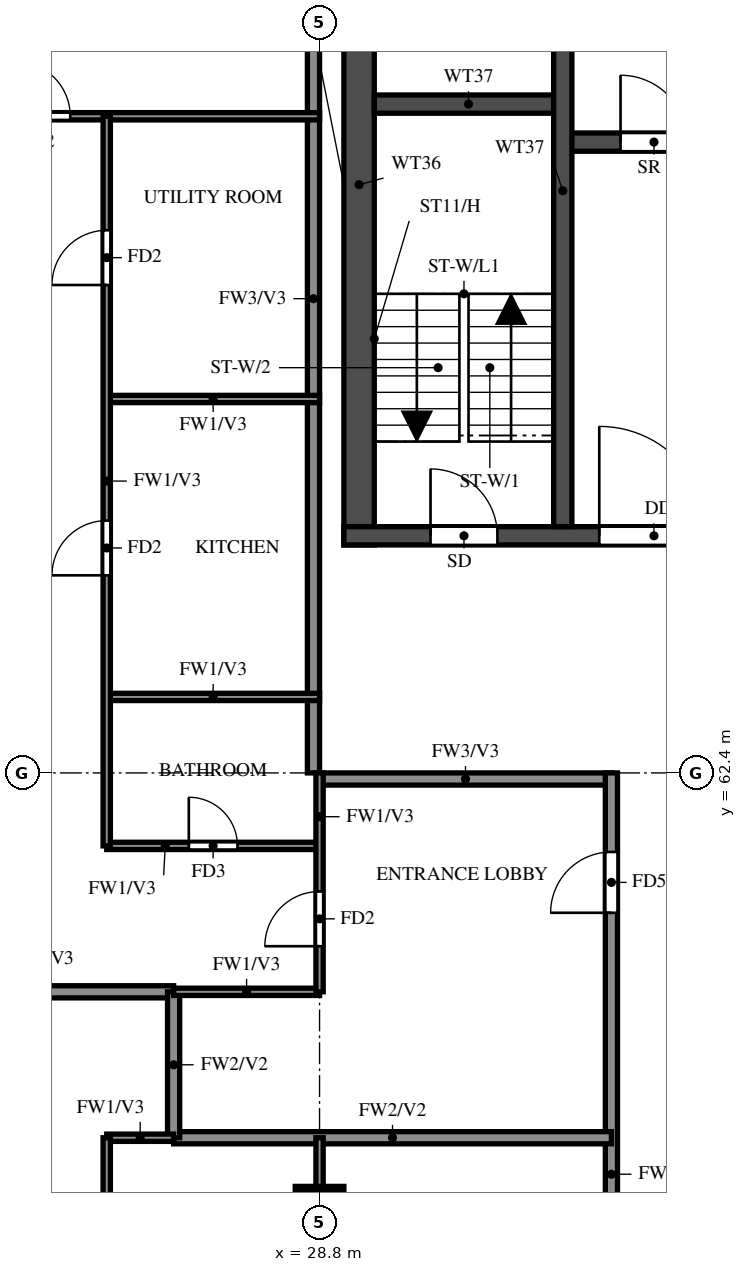
"""IFC4 building model, lengths in metres.
Left out: names, types, materials, properties, quantities, classifications, styles, units other than length and angle.
Written with IfcOpenShell. Run it as: python <this file> out.ifc"""

import sys

from ifc_helpers import new_model, si_unit, direction, frame, frame_2d, origin, origin_2d, place, context, subcontext, project, spatial, rectangle, extrude, source, transform, mapped, element, fill, save


model = new_model("IFC4")
c1 = context("Model", 3, precision=1e-05, world=origin(), true_north=direction((0.0, 1.0)))
c2 = subcontext(c1, "Body", "Model", "MODEL_VIEW")
j1 = project(units=[si_unit("LENGTHUNIT", "METRE"), si_unit("PLANEANGLEUNIT", "RADIAN")], contexts=[c1])
p1 = place(None, origin())
s1 = spatial("IfcSite", under=j1, at=p1, CompositionType="ELEMENT")
p2 = place(p1, origin())
s2 = spatial("IfcBuilding", under=s1, at=p2, CompositionType="ELEMENT")
p3 = place(p2, frame((0.0, 0.0, 232.5)))
s3 = spatial("IfcBuildingStorey", under=s2, at=p3, CompositionType="ELEMENT", Elevation=232.5)
m1 = source(origin(), c2, "Body", "SweptSolid", [
    extrude(rectangle(XDim=0.8, YDim=0.8, at=origin_2d()), origin(), (0.0, 0.0, 1.0), 3.22),
])
p4 = place(p3, frame((28.8, 55.2, 0.0), z_axis=(0.0, 0.0, 1.0), x_axis=(1.0, 0.0, 0.0)))
e1 = element("IfcColumn", 1, at=p4, inside=s3, PredefinedType="COLUMN", context=c2, shape_type="MappedRepresentation", body=[
    mapped(m1, transform((0.0, 0.0, 0.0))),
])
p5 = place(p3, frame((29.45, 66.15, 0.0), z_axis=(0.0, 0.0, 1.0), x_axis=(0.0, 1.0, 0.0)))
e2 = element("IfcWall", 2, at=p5, inside=s3, PredefinedType="SHEAR", context=c2, shape_type="SweptSolid", body=[
    extrude(rectangle(XDim=11.85, YDim=0.5, at=frame_2d((5.925, 0.0))), origin(), (0.0, 0.0, 1.0), 3.22),
])
p6 = place(p3, frame((29.2, 66.3, 0.0), z_axis=(0.0, 0.0, 1.0), x_axis=(1.0, 0.0, 0.0)))
e3 = element("IfcWall", 3, at=p6, inside=s3, PredefinedType="SHEAR", context=c2, shape_type="SweptSolid", body=[
    extrude(rectangle(XDim=42.4, YDim=0.3, at=frame_2d((21.2, 0.0))), origin(), (0.0, 0.0, 1.0), 3.22),
])
p7 = place(p6, frame((1.425, 0.0, 0.0)))
e4 = element("IfcOpeningElement", 4, at=p7, cuts=e3, PredefinedType="OPENING", context=c2, shape_type="SweptSolid", body=[
    extrude(rectangle(XDim=1.1, YDim=2.1, at=frame_2d((0.55, 1.05))), frame((0.0, 0.16, 0.0), z_axis=(0.0, -1.0, 0.0), x_axis=(1.0, 0.0, 0.0)), (0.0, 0.0, 1.0), 0.32),
])
p8 = place(p6, frame((4.2, 0.0, 0.0)))
e5 = element("IfcOpeningElement", 5, at=p8, cuts=e3, PredefinedType="OPENING", context=c2, shape_type="SweptSolid", body=[
    extrude(rectangle(XDim=1.8, YDim=2.1, at=frame_2d((0.9, 1.05))), frame((0.0, 0.16, 0.0), z_axis=(0.0, -1.0, 0.0), x_axis=(1.0, 0.0, 0.0)), (0.0, 0.0, 1.0), 0.32),
])
p9 = place(p3, frame((32.8, 72.775, 0.0), z_axis=(0.0, 0.0, 1.0), x_axis=(1.0, 0.0, 0.0)))
e6 = element("IfcWall", 6, at=p9, inside=s3, PredefinedType="SHEAR", context=c2, shape_type="SweptSolid", body=[
    extrude(rectangle(XDim=35.2, YDim=0.3, at=frame_2d((17.6, 0.0))), origin(), (0.0, 0.0, 1.0), 3.22),
])
p10 = place(p9, frame((19.8, 0.0, 0.0)))
e7 = element("IfcOpeningElement", 7, at=p10, cuts=e6, PredefinedType="OPENING", context=c2, shape_type="SweptSolid", body=[
    extrude(rectangle(XDim=1.1, YDim=2.1, at=frame_2d((0.55, 1.05))), frame((0.0, 0.16, 0.0), z_axis=(0.0, -1.0, 0.0), x_axis=(1.0, 0.0, 0.0)), (0.0, 0.0, 1.0), 0.32),
])
p11 = place(p9, frame((27.725, 0.0, 0.0)))
e8 = element("IfcOpeningElement", 8, at=p11, cuts=e6, PredefinedType="OPENING", context=c2, shape_type="SweptSolid", body=[
    extrude(rectangle(XDim=1.1, YDim=2.1, at=frame_2d((0.55, 1.05))), frame((0.0, 0.16, 0.0), z_axis=(0.0, -1.0, 0.0), x_axis=(1.0, 0.0, 0.0)), (0.0, 0.0, 1.0), 0.32),
])
p12 = place(p9, frame((30.325, 0.0, 0.0)))
e9 = element("IfcOpeningElement", 9, at=p12, cuts=e6, PredefinedType="OPENING", context=c2, shape_type="SweptSolid", body=[
    extrude(rectangle(XDim=1.1, YDim=2.1, at=frame_2d((0.55, 1.05))), frame((0.0, 0.16, 0.0), z_axis=(0.0, -1.0, 0.0), x_axis=(1.0, 0.0, 0.0)), (0.0, 0.0, 1.0), 0.32),
])
p13 = place(p9, frame((3.825, 0.0, 0.0)))
e10 = element("IfcOpeningElement", 10, at=p13, cuts=e6, PredefinedType="OPENING", context=c2, shape_type="SweptSolid", body=[
    extrude(rectangle(XDim=1.1, YDim=2.1, at=frame_2d((0.55, 1.05))), frame((0.0, 0.16, 0.0), z_axis=(0.0, -1.0, 0.0), x_axis=(1.0, 0.0, 0.0)), (0.0, 0.0, 1.0), 0.32),
])
p14 = place(p9, frame((6.575, 0.0, 0.0)))
e11 = element("IfcOpeningElement", 11, at=p14, cuts=e6, PredefinedType="OPENING", context=c2, shape_type="SweptSolid", body=[
    extrude(rectangle(XDim=1.1, YDim=2.1, at=frame_2d((0.55, 1.05))), frame((0.0, 0.16, 0.0), z_axis=(0.0, -1.0, 0.0), x_axis=(1.0, 0.0, 0.0)), (0.0, 0.0, 1.0), 0.32),
])
p15 = place(p9, frame((9.325, 0.0, 0.0)))
e12 = element("IfcOpeningElement", 12, at=p15, cuts=e6, PredefinedType="OPENING", context=c2, shape_type="SweptSolid", body=[
    extrude(rectangle(XDim=1.1, YDim=2.1, at=frame_2d((0.55, 1.05))), frame((0.0, 0.16, 0.0), z_axis=(0.0, -1.0, 0.0), x_axis=(1.0, 0.0, 0.0)), (0.0, 0.0, 1.0), 0.32),
])
p16 = place(p9, frame((12.075, 0.0, 0.0)))
e13 = element("IfcOpeningElement", 13, at=p16, cuts=e6, PredefinedType="OPENING", context=c2, shape_type="SweptSolid", body=[
    extrude(rectangle(XDim=1.1, YDim=2.1, at=frame_2d((0.55, 1.05))), frame((0.0, 0.16, 0.0), z_axis=(0.0, -1.0, 0.0), x_axis=(1.0, 0.0, 0.0)), (0.0, 0.0, 1.0), 0.32),
])
p17 = place(p9, frame((14.825, 0.0, 0.0)))
e14 = element("IfcOpeningElement", 14, at=p17, cuts=e6, PredefinedType="OPENING", context=c2, shape_type="SweptSolid", body=[
    extrude(rectangle(XDim=1.1, YDim=2.1, at=frame_2d((0.55, 1.05))), frame((0.0, 0.16, 0.0), z_axis=(0.0, -1.0, 0.0), x_axis=(1.0, 0.0, 0.0)), (0.0, 0.0, 1.0), 0.32),
])
p18 = place(p9, frame((17.575, 0.0, 0.0)))
e15 = element("IfcOpeningElement", 15, at=p18, cuts=e6, PredefinedType="OPENING", context=c2, shape_type="SweptSolid", body=[
    extrude(rectangle(XDim=1.1, YDim=2.1, at=frame_2d((0.55, 1.05))), frame((0.0, 0.16, 0.0), z_axis=(0.0, -1.0, 0.0), x_axis=(1.0, 0.0, 0.0)), (0.0, 0.0, 1.0), 0.32),
])
p19 = place(p9, frame((0.95, 0.0, 0.0)))
e16 = element("IfcOpeningElement", 16, at=p19, cuts=e6, PredefinedType="OPENING", context=c2, shape_type="SweptSolid", body=[
    extrude(rectangle(XDim=1.1, YDim=2.1, at=frame_2d((0.55, 1.05))), frame((0.0, 0.16, 0.0), z_axis=(0.0, -1.0, 0.0), x_axis=(1.0, 0.0, 0.0)), (0.0, 0.0, 1.0), 0.32),
])
p20 = place(p3, frame((29.7, 73.4, 0.0), z_axis=(0.0, 0.0, 1.0), x_axis=(1.0, 0.0, 0.0)))
e17 = element("IfcWall", 17, at=p20, inside=s3, PredefinedType="SHEAR", context=c2, shape_type="SweptSolid", body=[
    extrude(rectangle(XDim=3.1, YDim=0.3, at=frame_2d((1.55, 0.0))), origin(), (0.0, 0.0, 1.0), 3.22),
])
p21 = place(p3, frame((32.8, 66.45, 0.0), z_axis=(0.0, 0.0, 1.0), x_axis=(0.0, 1.0, 0.0)))
e18 = element("IfcWall", 18, at=p21, inside=s3, PredefinedType="SHEAR", context=c2, shape_type="SweptSolid", body=[
    extrude(rectangle(XDim=11.05, YDim=0.3, at=frame_2d((5.525, 0.0))), origin(), (0.0, 0.0, 1.0), 3.22),
])
p22 = place(p3, frame((28.8, 62.3, 0.0), z_axis=(0.0, 0.0, 1.0), x_axis=(1.0, 0.0, 0.0)))
e19 = element("IfcWall", 19, at=p22, inside=s3, PredefinedType="SOLIDWALL", context=c2, shape_type="SweptSolid", body=[
    extrude(rectangle(XDim=4.8, YDim=0.2, at=frame_2d((2.4, 0.0))), origin(), (0.0, 0.0, 1.0), 3.22),
])
p23 = place(p3, frame((28.7, 62.4, 0.0), z_axis=(0.0, 0.0, 1.0), x_axis=(0.0, 1.0, 0.0)))
e20 = element("IfcWall", 20, at=p23, inside=s3, PredefinedType="SOLIDWALL", context=c2, shape_type="SweptSolid", body=[
    extrude(rectangle(XDim=15.6, YDim=0.2, at=frame_2d((7.8, 0.0))), origin(), (0.0, 0.0, 1.0), 3.22),
])
p24 = place(p3, frame((33.6, 50.4, 0.0), z_axis=(0.0, 0.0, 1.0), x_axis=(0.0, 1.0, 0.0)))
e21 = element("IfcWall", 21, at=p24, inside=s3, PredefinedType="SOLIDWALL", context=c2, shape_type="SweptSolid", body=[
    extrude(rectangle(XDim=12.0, YDim=0.2, at=frame_2d((6.0, 0.0))), origin(), (0.0, 0.0, 1.0), 3.22),
])
p25 = place(p24, frame((0.7, 0.0, 0.0)))
e22 = element("IfcOpeningElement", 22, at=p25, cuts=e21, PredefinedType="OPENING", context=c2, shape_type="SweptSolid", body=[
    extrude(rectangle(XDim=1.0, YDim=2.1, at=frame_2d((0.5, 1.05))), frame((0.0, 0.11, 0.0), z_axis=(0.0, -1.0, 0.0), x_axis=(1.0, 0.0, 0.0)), (0.0, 0.0, 1.0), 0.22),
])
p26 = place(p24, frame((9.7, 0.0, 0.0)))
e23 = element("IfcOpeningElement", 23, at=p26, cuts=e21, PredefinedType="OPENING", context=c2, shape_type="SweptSolid", body=[
    extrude(rectangle(XDim=1.0, YDim=2.1, at=frame_2d((0.5, 1.05))), frame((0.0, 0.11, 0.0), z_axis=(0.0, -1.0, 0.0), x_axis=(1.0, 0.0, 0.0)), (0.0, 0.0, 1.0), 0.22),
])
p27 = place(p3, frame((26.4, 56.4, 0.0), z_axis=(0.0, 0.0, 1.0), x_axis=(1.0, 0.0, 0.0)))
e24 = element("IfcWall", 24, at=p27, inside=s3, PredefinedType="SOLIDWALL", context=c2, shape_type="SweptSolid", body=[
    extrude(rectangle(XDim=7.2, YDim=0.2, at=frame_2d((3.6, 0.0))), origin(), (0.0, 0.0, 1.0), 3.22),
])
p28 = place(p3, frame((18.525, 58.8, 0.0), z_axis=(0.0, 0.0, 1.0), x_axis=(1.0, 0.0, 0.0)))
e25 = element("IfcWall", 25, at=p28, inside=s3, PredefinedType="SOLIDWALL", context=c2, shape_type="SweptSolid", body=[
    extrude(rectangle(XDim=7.875, YDim=0.2, at=frame_2d((3.938, 0.0))), origin(), (0.0, 0.0, 1.0), 2.32),
])
p29 = place(p3, frame((26.4, 56.4, 0.0), z_axis=(0.0, 0.0, 1.0), x_axis=(0.0, 1.0, 0.0)))
e26 = element("IfcWall", 26, at=p29, inside=s3, PredefinedType="SOLIDWALL", context=c2, shape_type="SweptSolid", body=[
    extrude(rectangle(XDim=2.4, YDim=0.2, at=frame_2d((1.2, 0.0))), origin(), (0.0, 0.0, 1.0), 3.22),
])
p30 = place(p3, frame((25.3, 56.4, 0.0), z_axis=(0.0, 0.0, 1.0), x_axis=(1.0, 0.0, 0.0)))
e27 = element("IfcWall", 27, at=p30, inside=s3, PredefinedType="PARTITIONING", context=c2, shape_type="SweptSolid", body=[
    extrude(rectangle(XDim=1.1, YDim=0.12, at=frame_2d((0.55, 0.0))), origin(), (0.0, 0.0, 1.0), 3.22),
])
p31 = place(p3, frame((26.4, 58.8, 0.0), z_axis=(0.0, 0.0, 1.0), x_axis=(1.0, 0.0, 0.0)))
e28 = element("IfcWall", 28, at=p31, inside=s3, PredefinedType="PARTITIONING", context=c2, shape_type="SweptSolid", body=[
    extrude(rectangle(XDim=2.4, YDim=0.12, at=frame_2d((1.2, 0.0))), origin(), (0.0, 0.0, 1.0), 3.22),
])
p32 = place(p3, frame((25.3, 61.2, 0.0), z_axis=(0.0, 0.0, 1.0), x_axis=(1.0, 0.0, 0.0)))
e29 = element("IfcWall", 29, at=p32, inside=s3, PredefinedType="PARTITIONING", context=c2, shape_type="SweptSolid", body=[
    extrude(rectangle(XDim=3.5, YDim=0.12, at=frame_2d((1.75, 0.0))), origin(), (0.0, 0.0, 1.0), 3.22),
])
p33 = place(p32, frame((1.35, 0.0, 0.0)))
e30 = element("IfcOpeningElement", 30, at=p33, cuts=e29, PredefinedType="OPENING", context=c2, shape_type="SweptSolid", body=[
    extrude(rectangle(XDim=0.8, YDim=2.1, at=frame_2d((0.4, 1.05))), frame((0.0, 0.07, 0.0), z_axis=(0.0, -1.0, 0.0), x_axis=(1.0, 0.0, 0.0)), (0.0, 0.0, 1.0), 0.14),
])
for number, where, z_axis, x_axis in (
    (31, (25.3, 63.65, 0.0), (0.0, 0.0, 1.0), (1.0, 0.0, 0.0)),
    (32, (25.3, 68.55, 0.0), (0.0, 0.0, 1.0), (1.0, 0.0, 0.0)),
):
    element("IfcWall", number, at=place(p3, frame(where, z_axis=z_axis, x_axis=x_axis)), inside=s3, PredefinedType="PARTITIONING", context=c2, shape_type="SweptSolid", body=[
        extrude(rectangle(XDim=3.5, YDim=0.12, at=frame_2d((1.75, 0.0))), origin(), (0.0, 0.0, 1.0), 3.22),
    ])
p34 = place(p3, frame((18.525, 73.2, 0.0), z_axis=(0.0, 0.0, 1.0), x_axis=(1.0, 0.0, 0.0)))
e33 = element("IfcWall", 33, at=p34, inside=s3, PredefinedType="PARTITIONING", context=c2, shape_type="SweptSolid", body=[
    extrude(rectangle(XDim=10.275, YDim=0.12, at=frame_2d((5.138, 0.0))), origin(), (0.0, 0.0, 1.0), 2.32),
])
p35 = place(p34, frame((5.275, 0.0, 0.0)))
e34 = element("IfcOpeningElement", 34, at=p35, cuts=e33, PredefinedType="OPENING", context=c2, shape_type="SweptSolid", body=[
    extrude(rectangle(XDim=0.9, YDim=2.1, at=frame_2d((0.45, 1.05))), frame((0.0, 0.07, 0.0), z_axis=(0.0, -1.0, 0.0), x_axis=(1.0, 0.0, 0.0)), (0.0, 0.0, 1.0), 0.14),
])
p36 = place(p3, frame((25.3, 52.8, 0.0), z_axis=(0.0, 0.0, 1.0), x_axis=(0.0, 1.0, 0.0)))
e35 = element("IfcWall", 35, at=p36, inside=s3, PredefinedType="PARTITIONING", context=c2, shape_type="SweptSolid", body=[
    extrude(rectangle(XDim=3.6, YDim=0.12, at=frame_2d((1.8, 0.0))), origin(), (0.0, 0.0, 1.0), 3.22),
])
p37 = place(p36, frame((1.35, 0.0, 0.0)))
e36 = element("IfcOpeningElement", 36, at=p37, cuts=e35, PredefinedType="OPENING", context=c2, shape_type="SweptSolid", body=[
    extrude(rectangle(XDim=0.9, YDim=2.1, at=frame_2d((0.45, 1.05))), frame((0.0, 0.07, 0.0), z_axis=(0.0, -1.0, 0.0), x_axis=(1.0, 0.0, 0.0)), (0.0, 0.0, 1.0), 0.14),
])
p38 = place(p3, frame((25.3, 61.2, 0.0), z_axis=(0.0, 0.0, 1.0), x_axis=(0.0, 1.0, 0.0)))
e37 = element("IfcWall", 37, at=p38, inside=s3, PredefinedType="PARTITIONING", context=c2, shape_type="SweptSolid", body=[
    extrude(rectangle(XDim=12.0, YDim=0.12, at=frame_2d((6.0, 0.0))), origin(), (0.0, 0.0, 1.0), 3.22),
])
p39 = place(p38, frame((4.45, 0.0, 0.0)))
e38 = element("IfcOpeningElement", 38, at=p39, cuts=e37, PredefinedType="OPENING", context=c2, shape_type="SweptSolid", body=[
    extrude(rectangle(XDim=0.9, YDim=2.1, at=frame_2d((0.45, 1.05))), frame((0.0, 0.07, 0.0), z_axis=(0.0, -1.0, 0.0), x_axis=(1.0, 0.0, 0.0)), (0.0, 0.0, 1.0), 0.14),
])
p40 = place(p38, frame((9.225, 0.0, 0.0)))
e39 = element("IfcOpeningElement", 39, at=p40, cuts=e37, PredefinedType="OPENING", context=c2, shape_type="SweptSolid", body=[
    extrude(rectangle(XDim=0.9, YDim=2.1, at=frame_2d((0.45, 1.05))), frame((0.0, 0.07, 0.0), z_axis=(0.0, -1.0, 0.0), x_axis=(1.0, 0.0, 0.0)), (0.0, 0.0, 1.0), 0.14),
])
p41 = place(p3, frame((28.8, 52.8, 0.0), z_axis=(0.0, 0.0, 1.0), x_axis=(0.0, 1.0, 0.0)))
e40 = element("IfcWall", 40, at=p41, inside=s3, PredefinedType="PARTITIONING", context=c2, shape_type="SweptSolid", body=[
    extrude(rectangle(XDim=3.6, YDim=0.12, at=frame_2d((1.8, 0.0))), origin(), (0.0, 0.0, 1.0), 3.22),
])
p42 = place(p3, frame((28.8, 58.8, 0.0), z_axis=(0.0, 0.0, 1.0), x_axis=(0.0, 1.0, 0.0)))
e41 = element("IfcWall", 41, at=p42, inside=s3, PredefinedType="PARTITIONING", context=c2, shape_type="SweptSolid", body=[
    extrude(rectangle(XDim=3.6, YDim=0.12, at=frame_2d((1.8, 0.0))), origin(), (0.0, 0.0, 1.0), 3.22),
])
p43 = place(p42, frame((0.75, 0.0, 0.0)))
e42 = element("IfcOpeningElement", 42, at=p43, cuts=e41, PredefinedType="OPENING", context=c2, shape_type="SweptSolid", body=[
    extrude(rectangle(XDim=0.9, YDim=2.1, at=frame_2d((0.45, 1.05))), frame((0.0, 0.07, 0.0), z_axis=(0.0, -1.0, 0.0), x_axis=(1.0, 0.0, 0.0)), (0.0, 0.0, 1.0), 0.14),
])
p44 = place(p7, origin())
e43 = element("IfcDoor", 43, at=p44, inside=s3, OperationType="SINGLE_SWING_LEFT", PredefinedType="DOOR", context=c2, shape_type="SweptSolid", body=[
    extrude(rectangle(XDim=1.1, YDim=2.1, at=frame_2d((0.55, 1.05))), frame((0.0, 0.025, 0.0), z_axis=(0.0, -1.0, 0.0), x_axis=(1.0, 0.0, 0.0)), (0.0, 0.0, 1.0), 0.05),
])
fill(e4, e43)
p45 = place(p8, origin())
e44 = element("IfcDoor", 44, at=p45, inside=s3, OperationType="DOUBLE_DOOR_SINGLE_SWING", PredefinedType="DOOR", context=c2, shape_type="SweptSolid", body=[
    extrude(rectangle(XDim=1.8, YDim=2.1, at=frame_2d((0.9, 1.05))), frame((0.0, 0.025, 0.0), z_axis=(0.0, -1.0, 0.0), x_axis=(1.0, 0.0, 0.0)), (0.0, 0.0, 1.0), 0.05),
])
fill(e5, e44)
p46 = place(p19, origin())
e45 = element("IfcDoor", 45, at=p46, inside=s3, OperationType="SINGLE_SWING_LEFT", PredefinedType="DOOR", context=c2, shape_type="SweptSolid", body=[
    extrude(rectangle(XDim=1.1, YDim=2.1, at=frame_2d((0.55, 1.05))), frame((0.0, 0.025, 0.0), z_axis=(0.0, -1.0, 0.0), x_axis=(1.0, 0.0, 0.0)), (0.0, 0.0, 1.0), 0.05),
])
fill(e16, e45)
p47 = place(p43, origin())
e46 = element("IfcDoor", 46, at=p47, inside=s3, OperationType="SINGLE_SWING_RIGHT", PredefinedType="DOOR", context=c2, shape_type="SweptSolid", body=[
    extrude(rectangle(XDim=0.9, YDim=2.1, at=frame_2d((0.45, 1.05))), frame((0.0, 0.025, 0.0), z_axis=(0.0, -1.0, 0.0), x_axis=(1.0, 0.0, 0.0)), (0.0, 0.0, 1.0), 0.05),
])
fill(e42, e46)
p48 = place(p26, origin())
e47 = element("IfcDoor", 47, at=p48, inside=s3, OperationType="SINGLE_SWING_LEFT", PredefinedType="DOOR", context=c2, shape_type="SweptSolid", body=[
    extrude(rectangle(XDim=1.0, YDim=2.1, at=frame_2d((0.5, 1.05))), frame((0.0, 0.025, 0.0), z_axis=(0.0, -1.0, 0.0), x_axis=(1.0, 0.0, 0.0)), (0.0, 0.0, 1.0), 0.05),
])
fill(e23, e47)
p49 = place(p35, origin())
e48 = element("IfcDoor", 48, at=p49, inside=s3, OperationType="SINGLE_SWING_RIGHT", PredefinedType="DOOR", context=c2, shape_type="SweptSolid", body=[
    extrude(rectangle(XDim=0.9, YDim=2.1, at=frame_2d((0.45, 1.05))), frame((0.0, 0.025, 0.0), z_axis=(0.0, -1.0, 0.0), x_axis=(1.0, 0.0, 0.0)), (0.0, 0.0, 1.0), 0.05),
])
fill(e34, e48)
p50 = place(p33, origin())
e49 = element("IfcDoor", 49, at=p50, inside=s3, OperationType="SINGLE_SWING_LEFT", PredefinedType="DOOR", context=c2, shape_type="SweptSolid", body=[
    extrude(rectangle(XDim=0.8, YDim=2.1, at=frame_2d((0.4, 1.05))), frame((0.0, 0.025, 0.0), z_axis=(0.0, -1.0, 0.0), x_axis=(1.0, 0.0, 0.0)), (0.0, 0.0, 1.0), 0.05),
])
fill(e30, e49)
p51 = place(p39, origin())
e50 = element("IfcDoor", 50, at=p51, inside=s3, OperationType="SINGLE_SWING_LEFT", PredefinedType="DOOR", context=c2, shape_type="SweptSolid", body=[
    extrude(rectangle(XDim=0.9, YDim=2.1, at=frame_2d((0.45, 1.05))), frame((0.0, 0.025, 0.0), z_axis=(0.0, -1.0, 0.0), x_axis=(1.0, 0.0, 0.0)), (0.0, 0.0, 1.0), 0.05),
])
fill(e38, e50)
p52 = place(p40, origin())
e51 = element("IfcDoor", 51, at=p52, inside=s3, OperationType="SINGLE_SWING_RIGHT", PredefinedType="DOOR", context=c2, shape_type="SweptSolid", body=[
    extrude(rectangle(XDim=0.9, YDim=2.1, at=frame_2d((0.45, 1.05))), frame((0.0, 0.025, 0.0), z_axis=(0.0, -1.0, 0.0), x_axis=(1.0, 0.0, 0.0)), (0.0, 0.0, 1.0), 0.05),
])
fill(e39, e51)
save(model, sys.argv[1])
